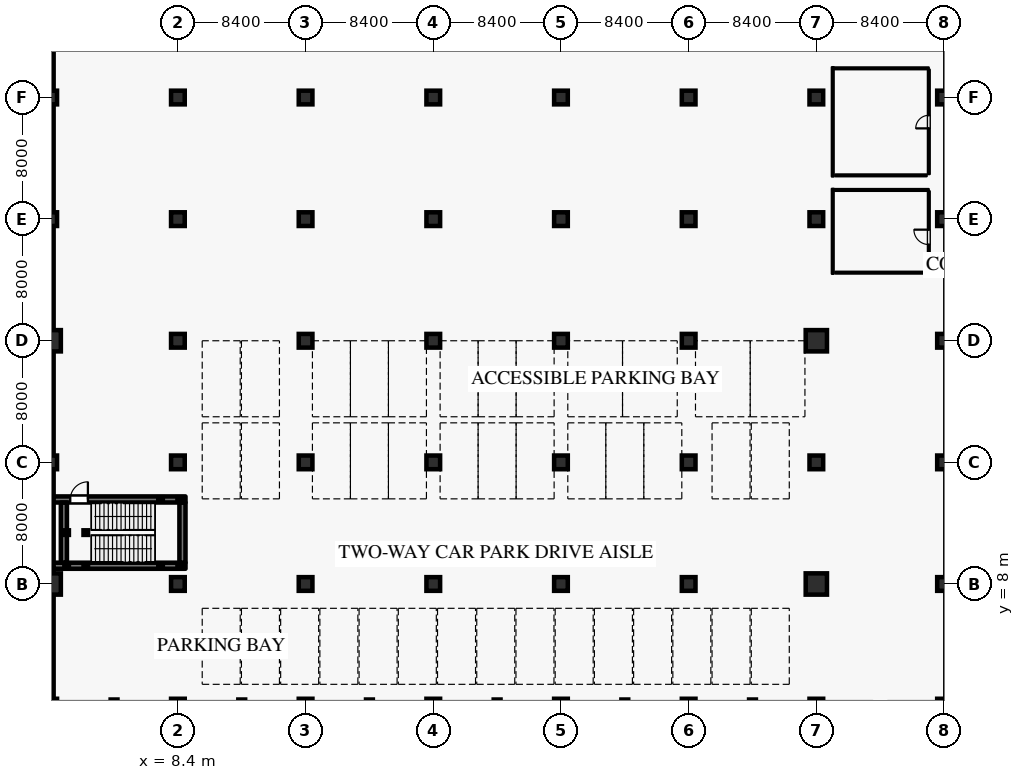
"""IFC4 building model, lengths in metres.
Left out: names, types, materials, properties, quantities, classifications, styles, units other than length and angle.
Written with IfcOpenShell. Run it as: python <this file> out.ifc"""

import sys

from ifc_helpers import new_model, si_unit, direction, frame, frame_2d, origin, origin_with_axes, origin_2d, place, context, subcontext, project, spatial, rectangle, hollow_rectangle, circle, extrude, element, fill, save


model = new_model("IFC4")
c1 = context("Model", 3, precision=1e-05, world=origin(), true_north=direction((0.0, 1.0)))
c2 = subcontext(c1, "Body", "Model", "MODEL_VIEW")
j1 = project(units=[si_unit("LENGTHUNIT", "METRE"), si_unit("PLANEANGLEUNIT", "RADIAN")], contexts=[c1])
p1 = place(None, origin())
s1 = spatial("IfcSite", under=j1, at=p1, CompositionType="ELEMENT")
p2 = place(p1, origin())
s2 = spatial("IfcBuilding", under=s1, at=p2, CompositionType="ELEMENT")
p3 = place(p2, frame((0.0, 0.0, -5.4)))
s3 = spatial("IfcBuildingStorey", under=s2, at=p3, CompositionType="ELEMENT", Elevation=-5.4)
p4 = place(p3, origin_with_axes())
e1 = element("IfcColumn", 1, at=p4, inside=s3, PredefinedType="COLUMN", context=c2, shape_type="SweptSolid", body=[
    extrude(rectangle(XDim=0.9, YDim=0.9, at=origin_2d()), origin(), (0.0, 0.0, 1.0), 5.4),
])
p5 = place(p3, frame((0.0, 8.0, 0.0), z_axis=(0.0, 0.0, 1.0), x_axis=(1.0, 0.0, 0.0)))
e2 = element("IfcColumn", 2, at=p5, inside=s3, PredefinedType="COLUMN", context=c2, shape_type="SweptSolid", body=[
    extrude(circle(Radius=0.7, at=origin_2d()), origin(), (0.0, 0.0, 1.0), 5.4),
])
p6 = place(p3, frame((0.0, 16.0, 0.0), z_axis=(0.0, 0.0, 1.0), x_axis=(1.0, 0.0, 0.0)))
e3 = element("IfcColumn", 3, at=p6, inside=s3, PredefinedType="COLUMN", context=c2, shape_type="SweptSolid", body=[
    extrude(rectangle(XDim=0.9, YDim=0.9, at=origin_2d()), origin(), (0.0, 0.0, 1.0), 5.4),
])
p7 = place(p3, frame((0.0, 24.0, 0.0), z_axis=(0.0, 0.0, 1.0), x_axis=(1.0, 0.0, 0.0)))
e4 = element("IfcColumn", 4, at=p7, inside=s3, PredefinedType="COLUMN", context=c2, shape_type="SweptSolid", body=[
    extrude(circle(Radius=0.7, at=origin_2d()), origin(), (0.0, 0.0, 1.0), 5.4),
])
for number, where, z_axis, x_axis in (
    (5, (0.0, 32.0, 0.0), (0.0, 0.0, 1.0), (1.0, 0.0, 0.0)),
    (6, (0.0, 40.0, 0.0), (0.0, 0.0, 1.0), (1.0, 0.0, 0.0)),
):
    element("IfcColumn", number, at=place(p3, frame(where, z_axis=z_axis, x_axis=x_axis)), inside=s3, PredefinedType="COLUMN", context=c2, shape_type="SweptSolid", body=[
        extrude(rectangle(XDim=0.9, YDim=0.9, at=origin_2d()), origin(), (0.0, 0.0, 1.0), 5.4),
    ])
p8 = place(p3, frame((4.2, 0.0, 0.0), z_axis=(0.0, 0.0, 1.0), x_axis=(1.0, 0.0, 0.0)))
e7 = element("IfcColumn", 7, at=p8, inside=s3, PredefinedType="PILASTER", context=c2, shape_type="SweptSolid", body=[
    extrude(rectangle(XDim=0.45, YDim=0.8, at=origin_2d()), origin(), (0.0, 0.0, 1.0), 5.4),
])
for number, where, z_axis, x_axis in (
    (8, (8.4, 0.0, 0.0), (0.0, 0.0, 1.0), (1.0, 0.0, 0.0)),
    (9, (8.4, 8.0, 0.0), (0.0, 0.0, 1.0), (1.0, 0.0, 0.0)),
    (10, (8.4, 16.0, 0.0), (0.0, 0.0, 1.0), (1.0, 0.0, 0.0)),
    (11, (8.4, 24.0, 0.0), (0.0, 0.0, 1.0), (1.0, 0.0, 0.0)),
    (12, (8.4, 32.0, 0.0), (0.0, 0.0, 1.0), (1.0, 0.0, 0.0)),
    (13, (8.4, 40.0, 0.0), (0.0, 0.0, 1.0), (1.0, 0.0, 0.0)),
):
    element("IfcColumn", number, at=place(p3, frame(where, z_axis=z_axis, x_axis=x_axis)), inside=s3, PredefinedType="COLUMN", context=c2, shape_type="SweptSolid", body=[
        extrude(rectangle(XDim=0.9, YDim=0.9, at=origin_2d()), origin(), (0.0, 0.0, 1.0), 5.4),
    ])
p9 = place(p3, frame((12.6, 0.0, 0.0), z_axis=(0.0, 0.0, 1.0), x_axis=(1.0, 0.0, 0.0)))
e14 = element("IfcColumn", 14, at=p9, inside=s3, PredefinedType="PILASTER", context=c2, shape_type="SweptSolid", body=[
    extrude(rectangle(XDim=0.45, YDim=0.8, at=origin_2d()), origin(), (0.0, 0.0, 1.0), 5.4),
])
for number, where, z_axis, x_axis in (
    (15, (16.8, 0.0, 0.0), (0.0, 0.0, 1.0), (1.0, 0.0, 0.0)),
    (16, (16.8, 8.0, 0.0), (0.0, 0.0, 1.0), (1.0, 0.0, 0.0)),
    (17, (16.8, 16.0, 0.0), (0.0, 0.0, 1.0), (1.0, 0.0, 0.0)),
    (18, (16.8, 24.0, 0.0), (0.0, 0.0, 1.0), (1.0, 0.0, 0.0)),
    (19, (16.8, 32.0, 0.0), (0.0, 0.0, 1.0), (1.0, 0.0, 0.0)),
    (20, (16.8, 40.0, 0.0), (0.0, 0.0, 1.0), (1.0, 0.0, 0.0)),
):
    element("IfcColumn", number, at=place(p3, frame(where, z_axis=z_axis, x_axis=x_axis)), inside=s3, PredefinedType="COLUMN", context=c2, shape_type="SweptSolid", body=[
        extrude(rectangle(XDim=0.9, YDim=0.9, at=origin_2d()), origin(), (0.0, 0.0, 1.0), 5.4),
    ])
p10 = place(p3, frame((21.0, 0.0, 0.0), z_axis=(0.0, 0.0, 1.0), x_axis=(1.0, 0.0, 0.0)))
e21 = element("IfcColumn", 21, at=p10, inside=s3, PredefinedType="PILASTER", context=c2, shape_type="SweptSolid", body=[
    extrude(rectangle(XDim=0.45, YDim=0.8, at=origin_2d()), origin(), (0.0, 0.0, 1.0), 5.4),
])
for number, where, z_axis, x_axis in (
    (22, (25.2, 0.0, 0.0), (0.0, 0.0, 1.0), (1.0, 0.0, 0.0)),
    (23, (25.2, 8.0, 0.0), (0.0, 0.0, 1.0), (1.0, 0.0, 0.0)),
    (24, (25.2, 16.0, 0.0), (0.0, 0.0, 1.0), (1.0, 0.0, 0.0)),
    (25, (25.2, 24.0, 0.0), (0.0, 0.0, 1.0), (1.0, 0.0, 0.0)),
    (26, (25.2, 32.0, 0.0), (0.0, 0.0, 1.0), (1.0, 0.0, 0.0)),
    (27, (25.2, 40.0, 0.0), (0.0, 0.0, 1.0), (1.0, 0.0, 0.0)),
):
    element("IfcColumn", number, at=place(p3, frame(where, z_axis=z_axis, x_axis=x_axis)), inside=s3, PredefinedType="COLUMN", context=c2, shape_type="SweptSolid", body=[
        extrude(rectangle(XDim=0.9, YDim=0.9, at=origin_2d()), origin(), (0.0, 0.0, 1.0), 5.4),
    ])
p11 = place(p3, frame((29.4, 0.0, 0.0), z_axis=(0.0, 0.0, 1.0), x_axis=(1.0, 0.0, 0.0)))
e28 = element("IfcColumn", 28, at=p11, inside=s3, PredefinedType="PILASTER", context=c2, shape_type="SweptSolid", body=[
    extrude(rectangle(XDim=0.45, YDim=0.8, at=origin_2d()), origin(), (0.0, 0.0, 1.0), 5.4),
])
for number, where, z_axis, x_axis in (
    (29, (33.6, 0.0, 0.0), (0.0, 0.0, 1.0), (1.0, 0.0, 0.0)),
    (30, (33.6, 8.0, 0.0), (0.0, 0.0, 1.0), (1.0, 0.0, 0.0)),
    (31, (33.6, 16.0, 0.0), (0.0, 0.0, 1.0), (1.0, 0.0, 0.0)),
    (32, (33.6, 24.0, 0.0), (0.0, 0.0, 1.0), (1.0, 0.0, 0.0)),
    (33, (33.6, 32.0, 0.0), (0.0, 0.0, 1.0), (1.0, 0.0, 0.0)),
    (34, (33.6, 40.0, 0.0), (0.0, 0.0, 1.0), (1.0, 0.0, 0.0)),
):
    element("IfcColumn", number, at=place(p3, frame(where, z_axis=z_axis, x_axis=x_axis)), inside=s3, PredefinedType="COLUMN", context=c2, shape_type="SweptSolid", body=[
        extrude(rectangle(XDim=0.9, YDim=0.9, at=origin_2d()), origin(), (0.0, 0.0, 1.0), 5.4),
    ])
p12 = place(p3, frame((37.8, 0.0, 0.0), z_axis=(0.0, 0.0, 1.0), x_axis=(1.0, 0.0, 0.0)))
e35 = element("IfcColumn", 35, at=p12, inside=s3, PredefinedType="PILASTER", context=c2, shape_type="SweptSolid", body=[
    extrude(rectangle(XDim=0.45, YDim=0.8, at=origin_2d()), origin(), (0.0, 0.0, 1.0), 5.4),
])
for number, where, z_axis, x_axis in (
    (36, (42.0, 0.0, 0.0), (0.0, 0.0, 1.0), (1.0, 0.0, 0.0)),
    (37, (42.0, 8.0, 0.0), (0.0, 0.0, 1.0), (1.0, 0.0, 0.0)),
    (38, (42.0, 16.0, 0.0), (0.0, 0.0, 1.0), (1.0, 0.0, 0.0)),
    (39, (42.0, 24.0, 0.0), (0.0, 0.0, 1.0), (1.0, 0.0, 0.0)),
    (40, (42.0, 32.0, 0.0), (0.0, 0.0, 1.0), (1.0, 0.0, 0.0)),
    (41, (42.0, 40.0, 0.0), (0.0, 0.0, 1.0), (1.0, 0.0, 0.0)),
):
    element("IfcColumn", number, at=place(p3, frame(where, z_axis=z_axis, x_axis=x_axis)), inside=s3, PredefinedType="COLUMN", context=c2, shape_type="SweptSolid", body=[
        extrude(rectangle(XDim=0.9, YDim=0.9, at=origin_2d()), origin(), (0.0, 0.0, 1.0), 5.4),
    ])
p13 = place(p3, frame((46.2, 0.0, 0.0), z_axis=(0.0, 0.0, 1.0), x_axis=(1.0, 0.0, 0.0)))
e42 = element("IfcColumn", 42, at=p13, inside=s3, PredefinedType="PILASTER", context=c2, shape_type="SweptSolid", body=[
    extrude(rectangle(XDim=0.45, YDim=0.8, at=origin_2d()), origin(), (0.0, 0.0, 1.0), 5.4),
])
p14 = place(p3, frame((50.4, 0.0, 0.0), z_axis=(0.0, 0.0, 1.0), x_axis=(1.0, 0.0, 0.0)))
e43 = element("IfcColumn", 43, at=p14, inside=s3, PredefinedType="COLUMN", context=c2, shape_type="SweptSolid", body=[
    extrude(rectangle(XDim=0.9, YDim=0.9, at=origin_2d()), origin(), (0.0, 0.0, 1.0), 5.4),
])
p15 = place(p3, frame((50.4, 8.0, 0.0), z_axis=(0.0, 0.0, 1.0), x_axis=(1.0, 0.0, 0.0)))
e44 = element("IfcColumn", 44, at=p15, inside=s3, PredefinedType="COLUMN", context=c2, shape_type="SweptSolid", body=[
    extrude(circle(Radius=0.7, at=origin_2d()), origin(), (0.0, 0.0, 1.0), 5.4),
])
p16 = place(p3, frame((50.4, 16.0, 0.0), z_axis=(0.0, 0.0, 1.0), x_axis=(1.0, 0.0, 0.0)))
e45 = element("IfcColumn", 45, at=p16, inside=s3, PredefinedType="COLUMN", context=c2, shape_type="SweptSolid", body=[
    extrude(rectangle(XDim=0.9, YDim=0.9, at=origin_2d()), origin(), (0.0, 0.0, 1.0), 5.4),
])
p17 = place(p3, frame((50.4, 24.0, 0.0), z_axis=(0.0, 0.0, 1.0), x_axis=(1.0, 0.0, 0.0)))
e46 = element("IfcColumn", 46, at=p17, inside=s3, PredefinedType="COLUMN", context=c2, shape_type="SweptSolid", body=[
    extrude(circle(Radius=0.7, at=origin_2d()), origin(), (0.0, 0.0, 1.0), 5.4),
])
for number, where, z_axis, x_axis in (
    (47, (50.4, 32.0, 0.0), (0.0, 0.0, 1.0), (1.0, 0.0, 0.0)),
    (48, (50.4, 40.0, 0.0), (0.0, 0.0, 1.0), (1.0, 0.0, 0.0)),
    (49, (58.8, 0.0, 0.0), (0.0, 0.0, 1.0), (1.0, 0.0, 0.0)),
    (50, (58.8, 8.0, 0.0), (0.0, 0.0, 1.0), (1.0, 0.0, 0.0)),
    (51, (58.8, 16.0, 0.0), (0.0, 0.0, 1.0), (1.0, 0.0, 0.0)),
    (52, (58.8, 24.0, 0.0), (0.0, 0.0, 1.0), (1.0, 0.0, 0.0)),
    (53, (58.8, 32.0, 0.0), (0.0, 0.0, 1.0), (1.0, 0.0, 0.0)),
    (54, (58.8, 40.0, 0.0), (0.0, 0.0, 1.0), (1.0, 0.0, 0.0)),
):
    element("IfcColumn", number, at=place(p3, frame(where, z_axis=z_axis, x_axis=x_axis)), inside=s3, PredefinedType="COLUMN", context=c2, shape_type="SweptSolid", body=[
        extrude(rectangle(XDim=0.9, YDim=0.9, at=origin_2d()), origin(), (0.0, 0.0, 1.0), 5.4),
    ])
for number, where, z_axis, x_axis in (
    (55, (0.0, 0.45, 0.0), (0.0, 0.0, 1.0), (0.0, 1.0, 0.0)),
    (56, (0.0, 8.7, 0.0), (0.0, 0.0, 1.0), (0.0, 1.0, 0.0)),
    (57, (0.0, 16.45, 0.0), (0.0, 0.0, 1.0), (0.0, 1.0, 0.0)),
    (58, (0.0, 24.7, 0.0), (0.0, 0.0, 1.0), (0.0, 1.0, 0.0)),
):
    element("IfcWall", number, at=place(p3, frame(where, z_axis=z_axis, x_axis=x_axis)), inside=s3, PredefinedType="USERDEFINED", context=c2, shape_type="SweptSolid", body=[
        extrude(rectangle(XDim=6.85, YDim=0.45, at=frame_2d((3.425, 0.0))), origin(), (0.0, 0.0, 1.0), 4.3),
    ])
p18 = place(p3, frame((0.0, 32.45, 0.0), z_axis=(0.0, 0.0, 1.0), x_axis=(0.0, 1.0, 0.0)))
e59 = element("IfcWall", 59, at=p18, inside=s3, PredefinedType="USERDEFINED", context=c2, shape_type="SweptSolid", body=[
    extrude(rectangle(XDim=7.1, YDim=0.45, at=frame_2d((3.55, 0.0))), origin(), (0.0, 0.0, 1.0), 4.3),
])
p19 = place(p3, frame((0.0, 40.45, 0.0), z_axis=(0.0, 0.0, 1.0), x_axis=(0.0, 1.0, 0.0)))
e60 = element("IfcWall", 60, at=p19, inside=s3, PredefinedType="USERDEFINED", context=c2, shape_type="SweptSolid", body=[
    extrude(rectangle(XDim=6.85, YDim=0.45, at=frame_2d((3.425, 0.0))), origin(), (0.0, 0.0, 1.0), 4.3),
])
p20 = place(p3, frame((0.225, 9.2, 0.0), z_axis=(0.0, 0.0, 1.0), x_axis=(1.0, 0.0, 0.0)))
e61 = element("IfcWall", 61, at=p20, inside=s3, PredefinedType="SHEAR", context=c2, shape_type="SweptSolid", body=[
    extrude(rectangle(XDim=8.675, YDim=0.4, at=frame_2d((4.337, 0.0))), origin(), (0.0, 0.0, 1.0), 4.995),
])
p21 = place(p3, frame((8.7, 9.405, 0.0), z_axis=(0.0, 0.0, 1.0), x_axis=(0.0, 1.0, 0.0)))
e62 = element("IfcWall", 62, at=p21, inside=s3, PredefinedType="SHEAR", context=c2, shape_type="SweptSolid", body=[
    extrude(rectangle(XDim=3.95, YDim=0.4, at=frame_2d((1.975, 0.0))), origin(), (0.0, 0.0, 1.0), 4.995),
])
p22 = place(p3, frame((0.225, 13.56, 0.0), z_axis=(0.0, 0.0, 1.0), x_axis=(1.0, 0.0, 0.0)))
e63 = element("IfcWall", 63, at=p22, inside=s3, PredefinedType="SHEAR", context=c2, shape_type="SweptSolid", body=[
    extrude(rectangle(XDim=8.675, YDim=0.4, at=frame_2d((4.337, 0.0))), origin(), (0.0, 0.0, 1.0), 4.995),
])
p23 = place(p22, frame((1.095, 0.0, 0.0)))
e64 = element("IfcOpeningElement", 64, at=p23, cuts=e63, PredefinedType="OPENING", context=c2, shape_type="SweptSolid", body=[
    extrude(rectangle(XDim=1.16, YDim=2.2, at=frame_2d((0.58, 1.1))), frame((0.0, 0.21, 0.0), z_axis=(0.0, -1.0, 0.0), x_axis=(1.0, 0.0, 0.0)), (0.0, 0.0, 1.0), 0.42),
])
p24 = place(p3, frame((0.9, 9.405, 0.0), z_axis=(0.0, 0.0, 1.0), x_axis=(0.0, 1.0, 0.0)))
e65 = element("IfcWall", 65, at=p24, inside=s3, PredefinedType="SHEAR", context=c2, shape_type="SweptSolid", body=[
    extrude(rectangle(XDim=3.95, YDim=0.4, at=frame_2d((1.975, 0.0))), origin(), (0.0, 0.0, 1.0), 4.995),
])
for number, where, z_axis, x_axis in (
    (66, (1.08, 9.2, 0.0), (0.0, 0.0, 1.0), (1.0, 0.0, 0.0)),
    (67, (1.08, 11.38, 0.0), (0.0, 0.0, 1.0), (1.0, 0.0, 0.0)),
    (68, (2.34, 9.2, 0.0), (0.0, 0.0, 1.0), (1.0, 0.0, 0.0)),
    (69, (2.34, 11.38, 0.0), (0.0, 0.0, 1.0), (1.0, 0.0, 0.0)),
):
    element("IfcColumn", number, at=place(p3, frame(where, z_axis=z_axis, x_axis=x_axis)), inside=s3, PredefinedType="COLUMN", context=c2, shape_type="SweptSolid", body=[
        extrude(hollow_rectangle(XDim=0.3, YDim=0.3, WallThickness=0.012, at=origin_2d()), origin(), (0.0, 0.0, 1.0), 5.22),
    ])
for number, where, z_axis, x_axis in (
    (70, (7.26, 9.2, 0.0), (0.0, 0.0, 1.0), (1.0, 0.0, 0.0)),
    (71, (7.26, 13.56, 0.0), (0.0, 0.0, 1.0), (1.0, 0.0, 0.0)),
    (72, (8.52, 9.2, 0.0), (0.0, 0.0, 1.0), (1.0, 0.0, 0.0)),
    (73, (8.52, 13.56, 0.0), (0.0, 0.0, 1.0), (1.0, 0.0, 0.0)),
):
    element("IfcColumn", number, at=place(p3, frame(where, z_axis=z_axis, x_axis=x_axis)), inside=s3, PredefinedType="COLUMN", context=c2, shape_type="SweptSolid", body=[
        extrude(hollow_rectangle(XDim=0.3, YDim=0.3, WallThickness=0.012, at=origin_2d()), origin(), (0.0, 0.0, 1.0), 2.52),
    ])
p25 = place(p3, frame((57.8, 28.56, 0.0), z_axis=(0.0, 0.0, 1.0), x_axis=(0.0, 1.0, 0.0)))
e74 = element("IfcWall", 74, at=p25, inside=s3, PredefinedType="PARTITIONING", context=c2, shape_type="SweptSolid", body=[
    extrude(rectangle(XDim=5.28, YDim=0.125, at=frame_2d((2.64, 0.0))), origin(), (0.0, 0.0, 1.0), 4.995),
])
p26 = place(p25, frame((1.768, 0.0, 0.0)))
e75 = element("IfcOpeningElement", 75, at=p26, cuts=e74, PredefinedType="OPENING", context=c2, shape_type="SweptSolid", body=[
    extrude(rectangle(XDim=0.98, YDim=2.15, at=frame_2d((0.49, 1.075))), frame((0.0, 0.073, 0.0), z_axis=(0.0, -1.0, 0.0), x_axis=(1.0, 0.0, 0.0)), (0.0, 0.0, 1.0), 0.145),
])
p27 = place(p3, frame((51.65, 28.48, 0.0), z_axis=(0.0, 0.0, 1.0), x_axis=(1.0, 0.0, 0.0)))
e76 = element("IfcWall", 76, at=p27, inside=s3, PredefinedType="PARTITIONING", context=c2, shape_type="SweptSolid", body=[
    extrude(rectangle(XDim=6.01, YDim=0.125, at=frame_2d((3.005, 0.0))), origin(), (0.0, 0.0, 1.0), 4.995),
])
p28 = place(p3, frame((57.8, 34.96, 0.0), z_axis=(0.0, 0.0, 1.0), x_axis=(0.0, 1.0, 0.0)))
e77 = element("IfcWall", 77, at=p28, inside=s3, PredefinedType="PARTITIONING", context=c2, shape_type="SweptSolid", body=[
    extrude(rectangle(XDim=6.88, YDim=0.125, at=frame_2d((3.44, 0.0))), origin(), (0.0, 0.0, 1.0), 4.995),
])
p29 = place(p28, frame((3.01, 0.0, 0.0)))
e78 = element("IfcOpeningElement", 78, at=p29, cuts=e77, PredefinedType="OPENING", context=c2, shape_type="SweptSolid", body=[
    extrude(rectangle(XDim=0.86, YDim=2.12, at=frame_2d((0.43, 1.06))), frame((0.0, 0.073, 0.0), z_axis=(0.0, -1.0, 0.0), x_axis=(1.0, 0.0, 0.0)), (0.0, 0.0, 1.0), 0.145),
])
p30 = place(p3, frame((51.65, 34.88, 0.0), z_axis=(0.0, 0.0, 1.0), x_axis=(1.0, 0.0, 0.0)))
e79 = element("IfcWall", 79, at=p30, inside=s3, PredefinedType="PARTITIONING", context=c2, shape_type="SweptSolid", body=[
    extrude(rectangle(XDim=6.01, YDim=0.125, at=frame_2d((3.005, 0.0))), origin(), (0.0, 0.0, 1.0), 4.995),
])
p31 = place(p3, frame((51.48, 28.4, 0.0), z_axis=(0.0, 0.0, 1.0), x_axis=(0.0, 1.0, 0.0)))
e80 = element("IfcWall", 80, at=p31, inside=s3, PredefinedType="PARTITIONING", context=c2, shape_type="SweptSolid", body=[
    extrude(rectangle(XDim=5.6, YDim=0.125, at=frame_2d((2.8, 0.0))), origin(), (0.0, 0.0, 1.0), 4.995),
])
p32 = place(p3, frame((51.542, 33.92, 0.0), z_axis=(0.0, 0.0, 1.0), x_axis=(1.0, 0.0, 0.0)))
e81 = element("IfcWall", 81, at=p32, inside=s3, PredefinedType="PARTITIONING", context=c2, shape_type="SweptSolid", body=[
    extrude(rectangle(XDim=6.254, YDim=0.125, at=frame_2d((3.127, 0.0))), origin(), (0.0, 0.0, 1.0), 4.995),
])
p33 = place(p3, frame((51.48, 34.8, 0.0), z_axis=(0.0, 0.0, 1.0), x_axis=(0.0, 1.0, 0.0)))
e82 = element("IfcWall", 82, at=p33, inside=s3, PredefinedType="PARTITIONING", context=c2, shape_type="SweptSolid", body=[
    extrude(rectangle(XDim=7.2, YDim=0.125, at=frame_2d((3.6, 0.0))), origin(), (0.0, 0.0, 1.0), 4.995),
])
p34 = place(p3, frame((51.542, 41.92, 0.0), z_axis=(0.0, 0.0, 1.0), x_axis=(1.0, 0.0, 0.0)))
e83 = element("IfcWall", 83, at=p34, inside=s3, PredefinedType="PARTITIONING", context=c2, shape_type="SweptSolid", body=[
    extrude(rectangle(XDim=6.254, YDim=0.125, at=frame_2d((3.127, 0.0))), origin(), (0.0, 0.0, 1.0), 4.995),
])
p35 = place(p23, origin())
e84 = element("IfcDoor", 84, at=p35, inside=s3, OperationType="SINGLE_SWING_RIGHT", PredefinedType="DOOR", context=c2, shape_type="SweptSolid", body=[
    extrude(rectangle(XDim=1.16, YDim=2.2, at=frame_2d((0.58, 1.1))), frame((0.0, 0.025, 0.0), z_axis=(0.0, -1.0, 0.0), x_axis=(1.0, 0.0, 0.0)), (0.0, 0.0, 1.0), 0.05),
])
fill(e64, e84)
p36 = place(p26, origin())
e85 = element("IfcDoor", 85, at=p36, inside=s3, OperationType="SINGLE_SWING_RIGHT", PredefinedType="DOOR", context=c2, shape_type="SweptSolid", body=[
    extrude(rectangle(XDim=0.98, YDim=2.15, at=frame_2d((0.49, 1.075))), frame((0.0, 0.025, 0.0), z_axis=(0.0, -1.0, 0.0), x_axis=(1.0, 0.0, 0.0)), (0.0, 0.0, 1.0), 0.05),
])
fill(e75, e85)
p37 = place(p29, origin())
e86 = element("IfcDoor", 86, at=p37, inside=s3, OperationType="SINGLE_SWING_LEFT", PredefinedType="DOOR", context=c2, shape_type="SweptSolid", body=[
    extrude(rectangle(XDim=0.86, YDim=2.12, at=frame_2d((0.43, 1.06))), frame((0.0, 0.025, 0.0), z_axis=(0.0, -1.0, 0.0), x_axis=(1.0, 0.0, 0.0)), (0.0, 0.0, 1.0), 0.05),
])
fill(e78, e86)
save(model, sys.argv[1])
